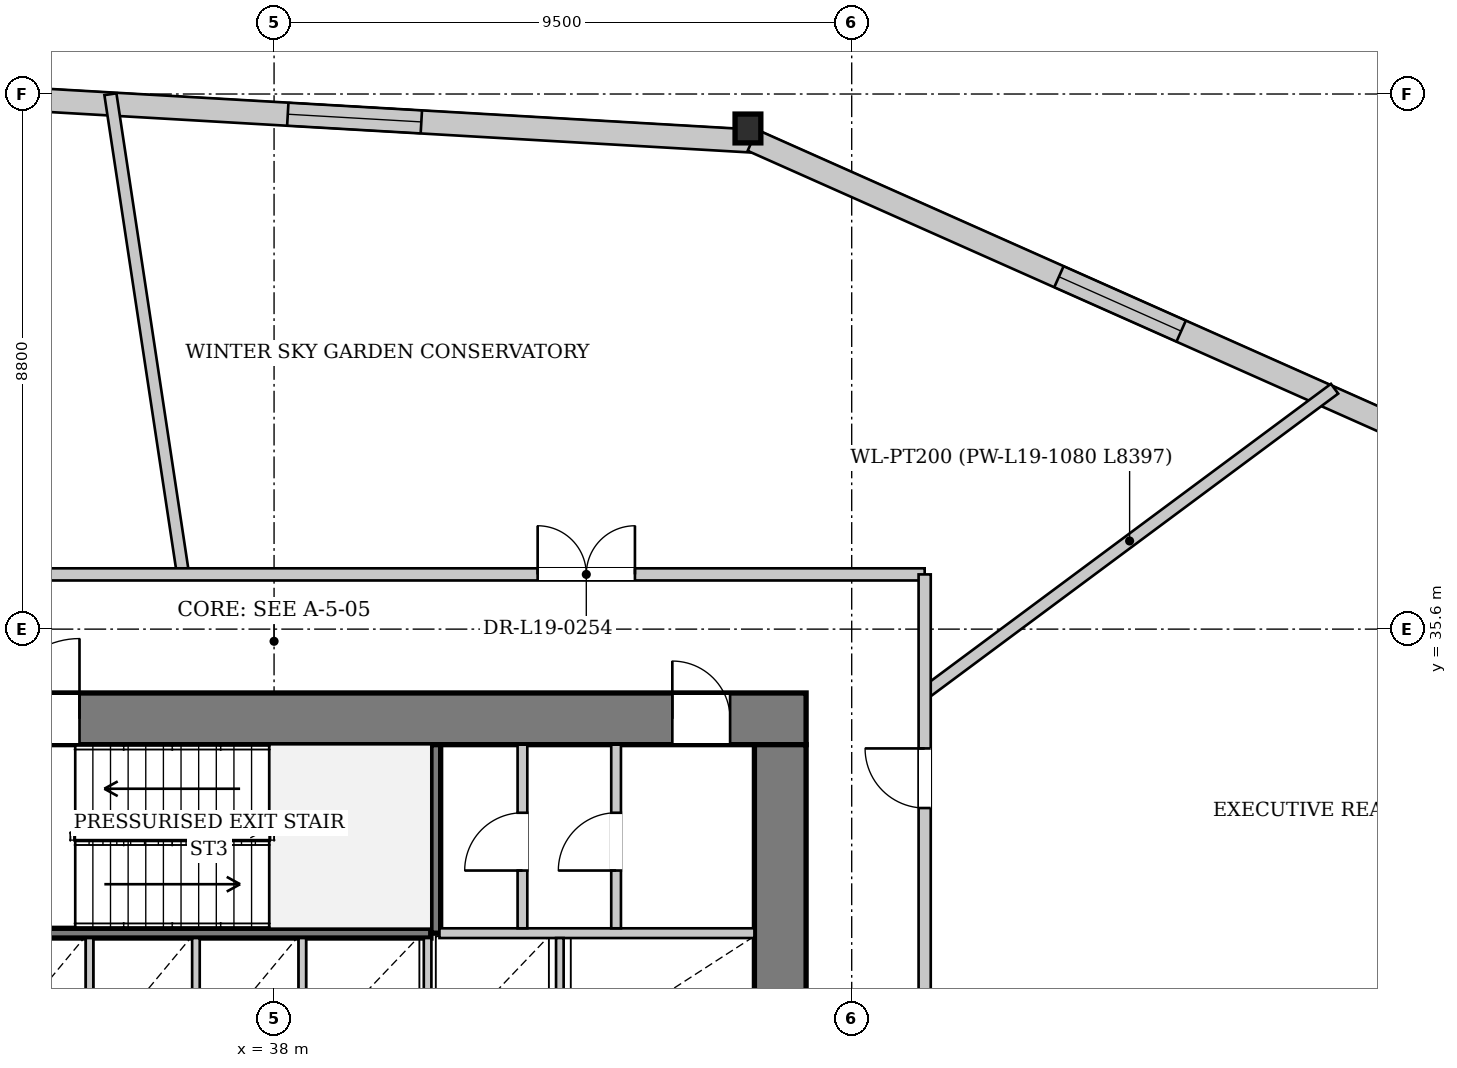
"""IFC4 building model, lengths in metres.
Left out: names, types, materials, properties, quantities, classifications, styles, units other than length and angle.
Written with IfcOpenShell. Run it as: python <this file> out.ifc"""

import sys

from ifc_helpers import new_model, si_unit, direction, frame, frame_2d, origin, origin_2d, place, context, subcontext, project, spatial, rectangle, i_section, extrude, source, transform, mapped, element, fill, save


model = new_model("IFC4")
c1 = context("Model", 3, precision=1e-05, world=origin(), true_north=direction((0.0, 1.0)))
c2 = subcontext(c1, "Body", "Model", "MODEL_VIEW")
j1 = project(units=[si_unit("LENGTHUNIT", "METRE"), si_unit("PLANEANGLEUNIT", "RADIAN")], contexts=[c1])
p1 = place(None, origin())
s1 = spatial("IfcSite", under=j1, at=p1, CompositionType="ELEMENT")
p2 = place(p1, origin())
s2 = spatial("IfcBuilding", under=s1, at=p2, CompositionType="ELEMENT")
p3 = place(p2, frame((0.0, 0.0, 75.9)))
s3 = spatial("IfcBuildingStorey", under=s2, at=p3, CompositionType="ELEMENT", Elevation=75.9)
m1 = source(origin(), c2, "Body", "SweptSolid", [
    extrude(i_section(OverallWidth=0.424, OverallDepth=0.474, WebThickness=0.043, FlangeThickness=0.068, at=origin_2d()), origin(), (0.0, 0.0, 1.0), 3.847),
])
p4 = place(p3, frame((45.943, 43.813, 0.0), z_axis=(-0.07774043655, 0.010534622422, 0.996917973685), x_axis=(-0.134282893313, -0.990943038001, 0.0)))
e1 = element("IfcColumn", 1, at=p4, inside=s3, PredefinedType="COLUMN", context=c2, shape_type="MappedRepresentation", body=[
    mapped(m1, transform((0.0, 0.0, 0.0), x_axis=(1.0, 0.0, 0.0), y_axis=(0.0, 1.0, 0.0), z_axis=(0.0, 0.0, 1.0), scale=1.0)),
])
m2 = source(origin(), c2, "Body", "SweptSolid", [
    extrude(i_section(OverallWidth=0.424, OverallDepth=0.474, WebThickness=0.043, FlangeThickness=0.068, at=origin_2d()), origin(), (0.0, 0.0, 1.0), 3.848),
])
p5 = place(p3, frame((34.143, 44.494, 0.0), z_axis=(-0.075687253982, -0.0318482829, 0.996622860696), x_axis=(0.387849749228, -0.921722611214, 0.0)))
e2 = element("IfcColumn", 2, at=p5, inside=s3, PredefinedType="COLUMN", context=c2, shape_type="MappedRepresentation", body=[
    mapped(m2, transform((0.0, 0.0, 0.0), x_axis=(1.0, 0.0, 0.0), y_axis=(0.0, 1.0, 0.0), z_axis=(0.0, 0.0, 1.0), scale=1.0)),
])
p6 = place(p3, frame((22.332, 44.985, 0.0), z_axis=(0.0, 0.0, 1.0), x_axis=(0.998339907415, -0.057597128944, 0.0)))
e3 = element("IfcWall", 3, at=p6, inside=s3, PredefinedType="SOLIDWALL", context=c2, shape_type="SweptSolid", body=[
    extrude(rectangle(XDim=23.64, YDim=0.38, at=frame_2d((11.82, 0.0))), origin(), (0.0, 0.0, 1.0), 2.872),
])
p7 = place(p6, frame((5.519, 0.0, 0.502)))
e4 = element("IfcOpeningElement", 4, at=p7, cuts=e3, PredefinedType="OPENING", context=c2, shape_type="SweptSolid", body=[
    extrude(rectangle(XDim=2.2, YDim=2.25, at=frame_2d((1.1, 1.125))), frame((0.0, 0.2, 0.0), z_axis=(0.0, -1.0, 0.0), x_axis=(1.0, 0.0, 0.0)), (0.0, 0.0, 1.0), 0.4),
])
p8 = place(p6, frame((15.92, 0.0, 0.502)))
e5 = element("IfcOpeningElement", 5, at=p8, cuts=e3, PredefinedType="OPENING", context=c2, shape_type="SweptSolid", body=[
    extrude(rectangle(XDim=2.2, YDim=2.25, at=frame_2d((1.1, 1.125))), frame((0.0, 0.2, 0.0), z_axis=(0.0, -1.0, 0.0), x_axis=(1.0, 0.0, 0.0)), (0.0, 0.0, 1.0), 0.4),
])
p9 = place(p3, frame((45.866, 43.639, 0.0), z_axis=(0.0, 0.0, 1.0), x_axis=(0.91360999261, -0.406591664207, 0.0)))
e6 = element("IfcWall", 6, at=p9, inside=s3, PredefinedType="SOLIDWALL", context=c2, shape_type="SweptSolid", body=[
    extrude(rectangle(XDim=23.639, YDim=0.38, at=frame_2d((11.82, 0.0))), origin(), (0.0, 0.0, 1.0), 2.872),
])
p10 = place(p9, frame((5.519, 0.0, 0.502)))
e7 = element("IfcOpeningElement", 7, at=p10, cuts=e6, PredefinedType="OPENING", context=c2, shape_type="SweptSolid", body=[
    extrude(rectangle(XDim=2.2, YDim=2.25, at=frame_2d((1.1, 1.125))), frame((0.0, 0.2, 0.0), z_axis=(0.0, -1.0, 0.0), x_axis=(1.0, 0.0, 0.0)), (0.0, 0.0, 1.0), 0.4),
])
p11 = place(p9, frame((15.92, 0.0, 0.502)))
e8 = element("IfcOpeningElement", 8, at=p11, cuts=e6, PredefinedType="OPENING", context=c2, shape_type="SweptSolid", body=[
    extrude(rectangle(XDim=2.2, YDim=2.25, at=frame_2d((1.1, 1.125))), frame((0.0, 0.2, 0.0), z_axis=(0.0, -1.0, 0.0), x_axis=(1.0, 0.0, 0.0)), (0.0, 0.0, 1.0), 0.4),
])
p12 = place(p3, frame((68.164, 30.08, 0.0), z_axis=(0.0, 0.0, 1.0), x_axis=(-0.721395971685, -0.692522816979, 0.0)))
e9 = element("IfcWall", 9, at=p12, inside=s3, PredefinedType="SOLIDWALL", context=c2, shape_type="SweptSolid", body=[
    extrude(rectangle(XDim=24.251, YDim=0.38, at=frame_2d((12.125, 0.0))), origin(), (0.0, 0.0, 1.0), 2.872),
])
p13 = place(p12, frame((5.69, 0.0, 0.502)))
e10 = element("IfcOpeningElement", 10, at=p13, cuts=e9, PredefinedType="OPENING", context=c2, shape_type="SweptSolid", body=[
    extrude(rectangle(XDim=2.2, YDim=2.25, at=frame_2d((1.1, 1.125))), frame((0.0, 0.2, 0.0), z_axis=(0.0, -1.0, 0.0), x_axis=(1.0, 0.0, 0.0)), (0.0, 0.0, 1.0), 0.4),
])
p14 = place(p12, frame((16.36, 0.0, 0.502)))
e11 = element("IfcOpeningElement", 11, at=p14, cuts=e9, PredefinedType="OPENING", context=c2, shape_type="SweptSolid", body=[
    extrude(rectangle(XDim=2.2, YDim=2.25, at=frame_2d((1.1, 1.125))), frame((0.0, 0.2, 0.0), z_axis=(0.0, -1.0, 0.0), x_axis=(1.0, 0.0, 0.0)), (0.0, 0.0, 1.0), 0.4),
])
p15 = place(p3, frame((29.25, 34.125, 0.0), z_axis=(0.0, 0.0, 1.0), x_axis=(1.0, 0.0, 0.0)))
e12 = element("IfcWall", 12, at=p15, inside=s3, PredefinedType="SHEAR", context=c2, shape_type="SweptSolid", body=[
    extrude(rectangle(XDim=17.5, YDim=0.85, at=frame_2d((8.75, 0.0))), origin(), (0.0, 0.0, 1.0), 3.58),
])
p16 = place(p15, frame((1.85, 0.0, 0.0)))
e13 = element("IfcOpeningElement", 13, at=p16, cuts=e12, PredefinedType="OPENING", context=c2, shape_type="SweptSolid", body=[
    extrude(rectangle(XDim=0.95, YDim=2.1, at=frame_2d((0.475, 1.05))), frame((0.0, 0.435, 0.0), z_axis=(0.0, -1.0, 0.0), x_axis=(1.0, 0.0, 0.0)), (0.0, 0.0, 1.0), 0.87),
])
p17 = place(p15, frame((4.23, 0.0, 0.0)))
e14 = element("IfcOpeningElement", 14, at=p17, cuts=e12, PredefinedType="OPENING", context=c2, shape_type="SweptSolid", body=[
    extrude(rectangle(XDim=1.32, YDim=2.2, at=frame_2d((0.66, 1.1))), frame((0.0, 0.435, 0.0), z_axis=(0.0, -1.0, 0.0), x_axis=(1.0, 0.0, 0.0)), (0.0, 0.0, 1.0), 0.87),
])
p18 = place(p15, frame((15.3, 0.0, 0.0)))
e15 = element("IfcOpeningElement", 15, at=p18, cuts=e12, PredefinedType="OPENING", context=c2, shape_type="SweptSolid", body=[
    extrude(rectangle(XDim=0.95, YDim=2.1, at=frame_2d((0.475, 1.05))), frame((0.0, 0.435, 0.0), z_axis=(0.0, -1.0, 0.0), x_axis=(1.0, 0.0, 0.0)), (0.0, 0.0, 1.0), 0.87),
])
p19 = place(p3, frame((46.325, 33.7, 0.0), z_axis=(0.0, 0.0, 1.0), x_axis=(0.0, -1.0, 0.0)))
e16 = element("IfcWall", 16, at=p19, inside=s3, PredefinedType="SHEAR", context=c2, shape_type="SweptSolid", body=[
    extrude(rectangle(XDim=14.2, YDim=0.85, at=frame_2d((7.1, 0.0))), origin(), (0.0, 0.0, 1.0), 3.58),
])
p20 = place(p19, frame((5.18, 0.0, 0.0)))
e17 = element("IfcOpeningElement", 17, at=p20, cuts=e16, PredefinedType="OPENING", context=c2, shape_type="SweptSolid", body=[
    extrude(rectangle(XDim=1.6, YDim=2.2, at=frame_2d((0.8, 1.1))), frame((0.0, 0.435, 0.0), z_axis=(0.0, -1.0, 0.0), x_axis=(1.0, 0.0, 0.0)), (0.0, 0.0, 1.0), 0.87),
])
p21 = place(p3, frame((33.28, 30.6, 0.0), z_axis=(0.0, 0.0, 1.0), x_axis=(1.0, 0.0, 0.0)))
e18 = element("IfcWall", 18, at=p21, inside=s3, PredefinedType="PARTITIONING", context=c2, shape_type="SweptSolid", body=[
    extrude(rectangle(XDim=7.3, YDim=0.16, at=frame_2d((3.65, 0.0))), origin(), (0.0, 0.0, 1.0), 3.58),
])
p22 = place(p3, frame((40.66, 30.6, 0.0), z_axis=(0.0, 0.0, 1.0), x_axis=(0.0, 1.0, 0.0)))
e19 = element("IfcWall", 19, at=p22, inside=s3, PredefinedType="PARTITIONING", context=c2, shape_type="SweptSolid", body=[
    extrude(rectangle(XDim=3.1, YDim=0.16, at=frame_2d((1.55, 0.0))), origin(), (0.0, 0.0, 1.0), 3.58),
])
p23 = place(p3, frame((40.72, 30.6, 0.0), z_axis=(0.0, 0.0, 1.0), x_axis=(1.0, 0.0, 0.0)))
e20 = element("IfcWall", 20, at=p23, inside=s3, PredefinedType="PARTITIONING", context=c2, shape_type="SweptSolid", body=[
    extrude(rectangle(XDim=5.18, YDim=0.16, at=frame_2d((2.59, 0.0))), origin(), (0.0, 0.0, 1.0), 3.58),
])
for number, where, z_axis, x_axis in (
    (21, (34.965, 28.6, 0.0), (0.0, 0.0, 1.0), (0.0, 1.0, 0.0)),
    (22, (36.715, 28.6, 0.0), (0.0, 0.0, 1.0), (0.0, 1.0, 0.0)),
    (23, (38.465, 28.6, 0.0), (0.0, 0.0, 1.0), (0.0, 1.0, 0.0)),
    (24, (40.525, 28.6, 0.0), (0.0, 0.0, 1.0), (0.0, 1.0, 0.0)),
    (25, (42.7, 28.6, 0.0), (0.0, 0.0, 1.0), (0.0, 1.0, 0.0)),
):
    element("IfcWall", number, at=place(p3, frame(where, z_axis=z_axis, x_axis=x_axis)), inside=s3, PredefinedType="PARTITIONING", context=c2, shape_type="SweptSolid", body=[
        extrude(rectangle(XDim=1.92, YDim=0.125, at=frame_2d((0.96, 0.0))), origin(), (0.0, 0.0, 1.0), 3.58),
    ])
p24 = place(p3, frame((42.085, 30.68, 0.0), z_axis=(0.0, 0.0, 1.0), x_axis=(0.0, 1.0, 0.0)))
e26 = element("IfcWall", 26, at=p24, inside=s3, PredefinedType="PARTITIONING", context=c2, shape_type="SweptSolid", body=[
    extrude(rectangle(XDim=3.02, YDim=0.16, at=frame_2d((1.51, 0.0))), origin(), (0.0, 0.0, 1.0), 3.58),
])
p25 = place(p24, frame((0.95, 0.0, 0.0)))
e27 = element("IfcOpeningElement", 27, at=p25, cuts=e26, PredefinedType="OPENING", context=c2, shape_type="SweptSolid", body=[
    extrude(rectangle(XDim=0.95, YDim=2.1, at=frame_2d((0.475, 1.05))), frame((0.0, 0.09, 0.0), z_axis=(0.0, -1.0, 0.0), x_axis=(1.0, 0.0, 0.0)), (0.0, 0.0, 1.0), 0.18),
])
p26 = place(p3, frame((43.625, 30.68, 0.0), z_axis=(0.0, 0.0, 1.0), x_axis=(0.0, 1.0, 0.0)))
e28 = element("IfcWall", 28, at=p26, inside=s3, PredefinedType="PARTITIONING", context=c2, shape_type="SweptSolid", body=[
    extrude(rectangle(XDim=3.02, YDim=0.16, at=frame_2d((1.51, 0.0))), origin(), (0.0, 0.0, 1.0), 3.58),
])
p27 = place(p26, frame((0.95, 0.0, 0.0)))
e29 = element("IfcOpeningElement", 29, at=p27, cuts=e28, PredefinedType="OPENING", context=c2, shape_type="SweptSolid", body=[
    extrude(rectangle(XDim=0.95, YDim=2.1, at=frame_2d((0.475, 1.05))), frame((0.0, 0.09, 0.0), z_axis=(0.0, -1.0, 0.0), x_axis=(1.0, 0.0, 0.0)), (0.0, 0.0, 1.0), 0.18),
])
p28 = place(p3, frame((48.7, 34.546, 0.0), z_axis=(0.0, 0.0, 1.0), x_axis=(0.8028205869, 0.596220685023, 0.0)))
e30 = element("IfcWall", 30, at=p28, inside=s3, PredefinedType="PARTITIONING", context=c2, shape_type="SweptSolid", body=[
    extrude(rectangle(XDim=8.397, YDim=0.2, at=frame_2d((4.199, 0.0))), origin(), (0.0, 0.0, 1.0), 3.58),
])
p29 = place(p3, frame((36.503, 36.5, 0.0), z_axis=(0.0, 0.0, 1.0), x_axis=(-0.14951830516, 0.988758957695, 0.0)))
e31 = element("IfcWall", 31, at=p29, inside=s3, PredefinedType="PARTITIONING", context=c2, shape_type="SweptSolid", body=[
    extrude(rectangle(XDim=7.986, YDim=0.2, at=frame_2d((3.993, 0.0))), origin(), (0.0, 0.0, 1.0), 3.58),
])
p30 = place(p3, frame((27.3, 36.5, 0.0), z_axis=(0.0, 0.0, 1.0), x_axis=(1.0, 0.0, 0.0)))
e32 = element("IfcWall", 32, at=p30, inside=s3, PredefinedType="PARTITIONING", context=c2, shape_type="SweptSolid", body=[
    extrude(rectangle(XDim=21.4, YDim=0.2, at=frame_2d((10.7, 0.0))), origin(), (0.0, 0.0, 1.0), 3.58),
])
p31 = place(p30, frame((15.035, 0.0, 0.0)))
e33 = element("IfcOpeningElement", 33, at=p31, cuts=e32, PredefinedType="OPENING", context=c2, shape_type="SweptSolid", body=[
    extrude(rectangle(XDim=1.6, YDim=2.2, at=frame_2d((0.8, 1.1))), frame((0.0, 0.11, 0.0), z_axis=(0.0, -1.0, 0.0), x_axis=(1.0, 0.0, 0.0)), (0.0, 0.0, 1.0), 0.22),
])
p32 = place(p3, frame((48.7, 16.7, 0.0), z_axis=(0.0, 0.0, 1.0), x_axis=(0.0, 1.0, 0.0)))
e34 = element("IfcWall", 34, at=p32, inside=s3, PredefinedType="PARTITIONING", context=c2, shape_type="SweptSolid", body=[
    extrude(rectangle(XDim=19.8, YDim=0.2, at=frame_2d((9.9, 0.0))), origin(), (0.0, 0.0, 1.0), 3.58),
])
p33 = place(p32, frame((2.915, 0.0, 0.0)))
e35 = element("IfcOpeningElement", 35, at=p33, cuts=e34, PredefinedType="OPENING", context=c2, shape_type="SweptSolid", body=[
    extrude(rectangle(XDim=0.98, YDim=2.15, at=frame_2d((0.49, 1.075))), frame((0.0, 0.11, 0.0), z_axis=(0.0, -1.0, 0.0), x_axis=(1.0, 0.0, 0.0)), (0.0, 0.0, 1.0), 0.22),
])
p34 = place(p32, frame((15.958, 0.0, 0.0)))
e36 = element("IfcOpeningElement", 36, at=p34, cuts=e34, PredefinedType="OPENING", context=c2, shape_type="SweptSolid", body=[
    extrude(rectangle(XDim=0.98, YDim=2.15, at=frame_2d((0.49, 1.075))), frame((0.0, 0.11, 0.0), z_axis=(0.0, -1.0, 0.0), x_axis=(1.0, 0.0, 0.0)), (0.0, 0.0, 1.0), 0.22),
])
m3 = source(origin(), c2, "Body", "SweptSolid", [
    extrude(rectangle(XDim=2.2, YDim=2.25, at=frame_2d((1.1, 1.125))), frame((0.0, 0.03, 0.0), z_axis=(0.0, -1.0, 0.0), x_axis=(1.0, 0.0, 0.0)), (0.0, 0.0, 1.0), 0.06),
])
p35 = place(p8, origin())
e37 = element("IfcWindow", 37, at=p35, inside=s3, PartitioningType="SINGLE_PANEL", PredefinedType="WINDOW", context=c2, shape_type="MappedRepresentation", body=[
    mapped(m3, transform((0.0, 0.0, 0.0), x_axis=(1.0, 0.0, 0.0), y_axis=(0.0, 1.0, 0.0), z_axis=(0.0, 0.0, 1.0), scale=1.0)),
])
fill(e5, e37)
p36 = place(p10, origin())
e38 = element("IfcWindow", 38, at=p36, inside=s3, PartitioningType="SINGLE_PANEL", PredefinedType="WINDOW", context=c2, shape_type="MappedRepresentation", body=[
    mapped(m3, transform((0.0, 0.0, 0.0), x_axis=(1.0, 0.0, 0.0), y_axis=(0.0, 1.0, 0.0), z_axis=(0.0, 0.0, 1.0), scale=1.0)),
])
fill(e7, e38)
m4 = source(origin(), c2, "Body", "SweptSolid", [
    extrude(rectangle(XDim=1.32, YDim=2.2, at=frame_2d((0.66, 1.1))), frame((0.0, 0.025, 0.0), z_axis=(0.0, -1.0, 0.0), x_axis=(1.0, 0.0, 0.0)), (0.0, 0.0, 1.0), 0.05),
])
p37 = place(p17, origin())
e39 = element("IfcDoor", 39, at=p37, inside=s3, OperationType="SINGLE_SWING_RIGHT", PredefinedType="DOOR", context=c2, shape_type="MappedRepresentation", body=[
    mapped(m4, transform((0.0, 0.0, 0.0), x_axis=(1.0, 0.0, 0.0), y_axis=(0.0, 1.0, 0.0), z_axis=(0.0, 0.0, 1.0), scale=1.0)),
])
fill(e14, e39)
m5 = source(origin(), c2, "Body", "SweptSolid", [
    extrude(rectangle(XDim=0.95, YDim=2.1, at=frame_2d((0.475, 1.05))), frame((0.0, 0.025, 0.0), z_axis=(0.0, -1.0, 0.0), x_axis=(1.0, 0.0, 0.0)), (0.0, 0.0, 1.0), 0.05),
])
p38 = place(p25, origin())
e40 = element("IfcDoor", 40, at=p38, inside=s3, OperationType="SINGLE_SWING_LEFT", PredefinedType="DOOR", context=c2, shape_type="MappedRepresentation", body=[
    mapped(m5, transform((0.0, 0.0, 0.0), x_axis=(1.0, 0.0, 0.0), y_axis=(0.0, 1.0, 0.0), z_axis=(0.0, 0.0, 1.0), scale=1.0)),
])
fill(e27, e40)
p39 = place(p27, origin())
e41 = element("IfcDoor", 41, at=p39, inside=s3, OperationType="SINGLE_SWING_LEFT", PredefinedType="DOOR", context=c2, shape_type="MappedRepresentation", body=[
    mapped(m5, transform((0.0, 0.0, 0.0), x_axis=(1.0, 0.0, 0.0), y_axis=(0.0, 1.0, 0.0), z_axis=(0.0, 0.0, 1.0), scale=1.0)),
])
fill(e29, e41)
p40 = place(p18, origin())
e42 = element("IfcDoor", 42, at=p40, inside=s3, OperationType="SINGLE_SWING_LEFT", PredefinedType="DOOR", context=c2, shape_type="MappedRepresentation", body=[
    mapped(m5, transform((0.0, 0.0, 0.0), x_axis=(1.0, 0.0, 0.0), y_axis=(0.0, 1.0, 0.0), z_axis=(0.0, 0.0, 1.0), scale=1.0)),
])
fill(e15, e42)
m6 = source(origin(), c2, "Body", "SweptSolid", [
    extrude(rectangle(XDim=1.6, YDim=2.2, at=frame_2d((0.8, 1.1))), frame((0.0, 0.025, 0.0), z_axis=(0.0, -1.0, 0.0), x_axis=(1.0, 0.0, 0.0)), (0.0, 0.0, 1.0), 0.05),
])
p41 = place(p31, origin())
e43 = element("IfcDoor", 43, at=p41, inside=s3, OperationType="DOUBLE_DOOR_SINGLE_SWING", PredefinedType="DOOR", context=c2, shape_type="MappedRepresentation", body=[
    mapped(m6, transform((0.0, 0.0, 0.0), x_axis=(1.0, 0.0, 0.0), y_axis=(0.0, 1.0, 0.0), z_axis=(0.0, 0.0, 1.0), scale=1.0)),
])
fill(e33, e43)
m7 = source(origin(), c2, "Body", "SweptSolid", [
    extrude(rectangle(XDim=0.98, YDim=2.15, at=frame_2d((0.49, 1.075))), frame((0.0, 0.025, 0.0), z_axis=(0.0, -1.0, 0.0), x_axis=(1.0, 0.0, 0.0)), (0.0, 0.0, 1.0), 0.05),
])
p42 = place(p34, origin())
e44 = element("IfcDoor", 44, at=p42, inside=s3, OperationType="SINGLE_SWING_RIGHT", PredefinedType="DOOR", context=c2, shape_type="MappedRepresentation", body=[
    mapped(m7, transform((0.0, 0.0, 0.0), x_axis=(1.0, 0.0, 0.0), y_axis=(0.0, 1.0, 0.0), z_axis=(0.0, 0.0, 1.0), scale=1.0)),
])
fill(e36, e44)
save(model, sys.argv[1])
